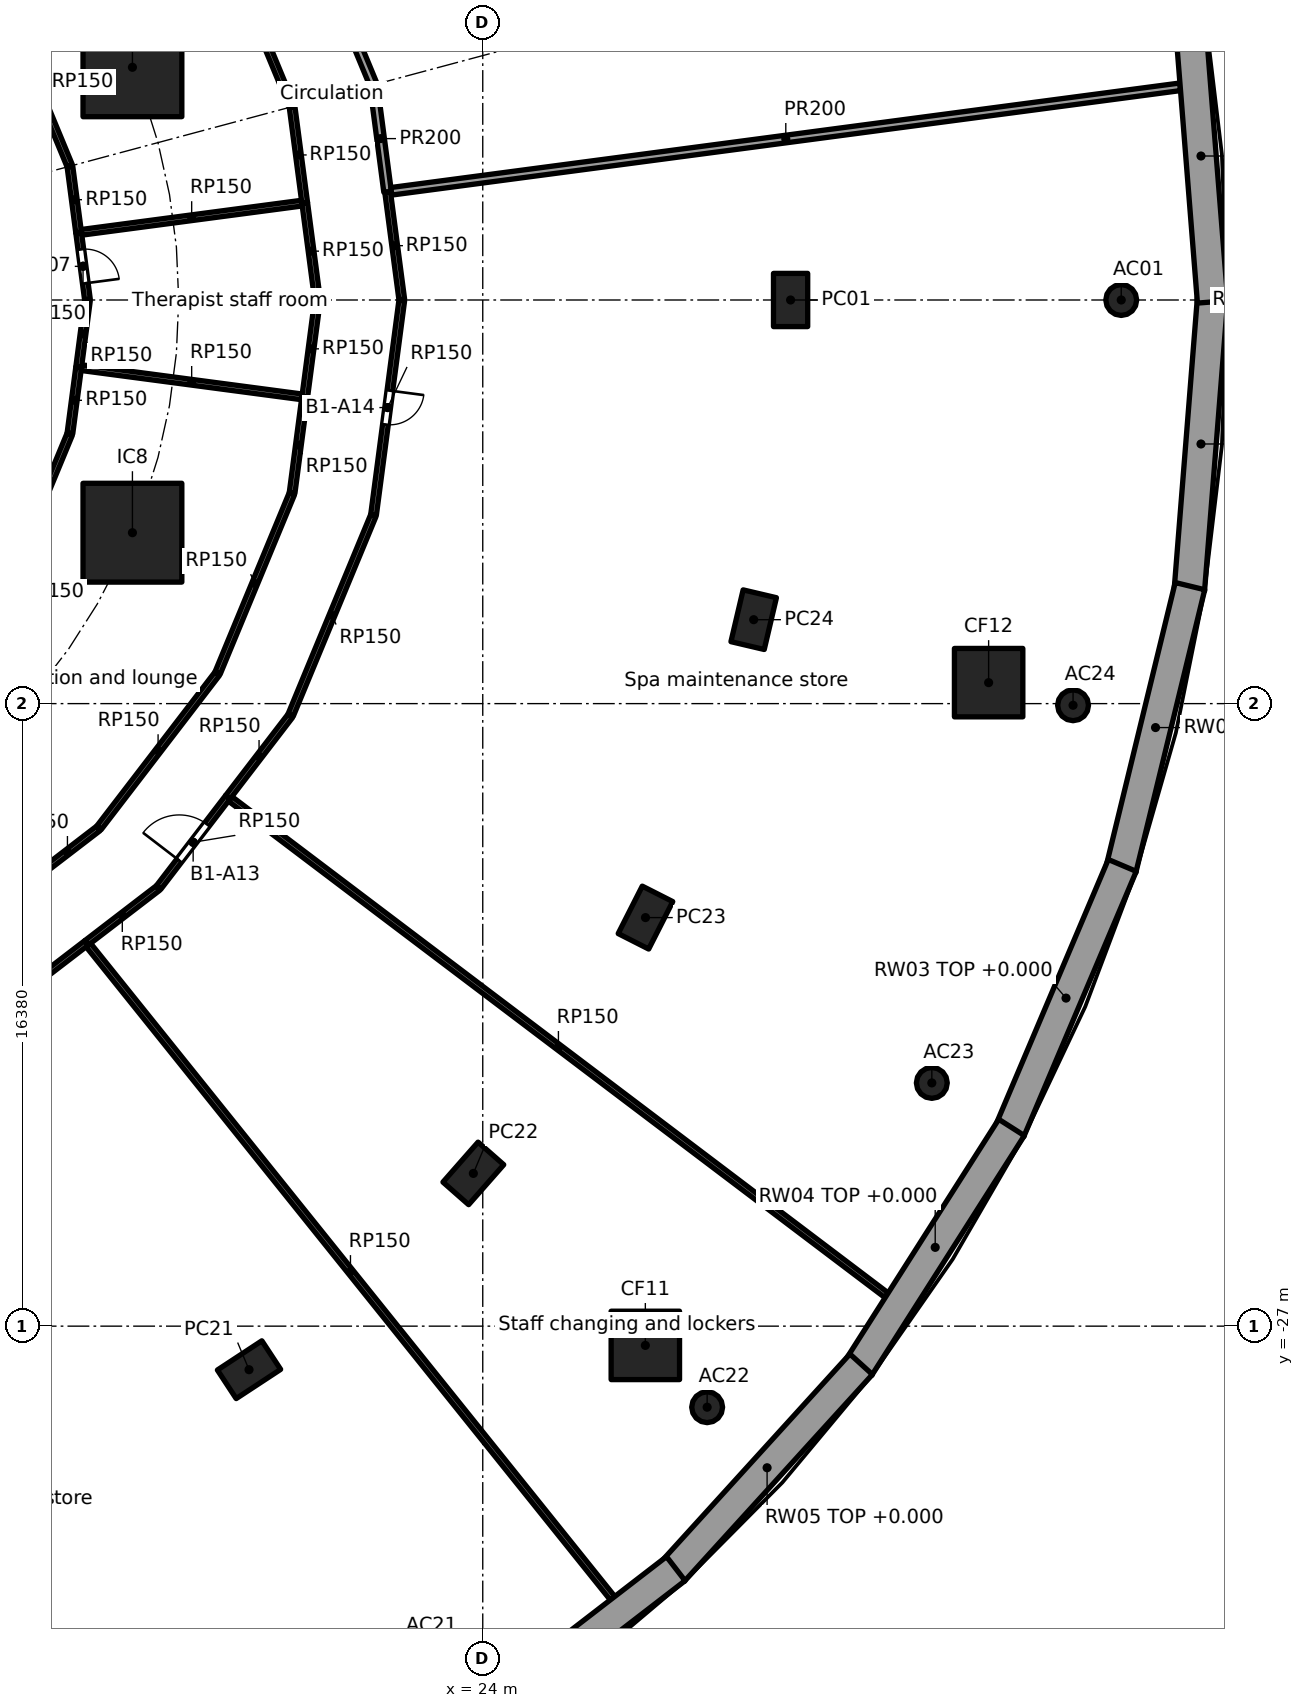
"""IFC4 building model, lengths in metres.
Left out: names, types, materials, properties, quantities, classifications, styles, units other than length and angle.
Written with IfcOpenShell. Run it as: python <this file> out.ifc"""

import sys

from ifc_helpers import new_model, si_unit, direction, frame, frame_2d, origin, origin_2d, place, context, subcontext, project, spatial, rectangle, hollow_rectangle, hollow_circle, extrude, element, fill, save


model = new_model("IFC4")
c1 = context("Model", 3, precision=1e-05, world=origin(), true_north=direction((0.0, 1.0)))
c2 = subcontext(c1, "Body", "Model", "MODEL_VIEW")
j1 = project(units=[si_unit("LENGTHUNIT", "METRE"), si_unit("PLANEANGLEUNIT", "RADIAN")], contexts=[c1])
p1 = place(None, origin())
s1 = spatial("IfcSite", under=j1, at=p1, CompositionType="ELEMENT")
p2 = place(p1, origin())
s2 = spatial("IfcBuilding", under=s1, at=p2, CompositionType="ELEMENT")
p3 = place(p2, frame((0.0, 0.0, -5.0)))
s3 = spatial("IfcBuildingStorey", under=s2, at=p3, CompositionType="ELEMENT", Elevation=-5.0)
p4 = place(p3, frame((43.204, 0.05, 0.0), z_axis=(0.0, 0.0, 1.0), x_axis=(-0.079287821658, -0.996851764977, 0.0)))
e1 = element("IfcWall", 1, at=p4, inside=s3, PredefinedType="SOLIDWALL", context=c2, shape_type="SweptSolid", body=[
    extrude(rectangle(XDim=7.701, YDim=0.8, at=frame_2d((3.851, 0.0))), origin(), (0.0, 0.0, 1.0), 5.0),
])
p5 = place(p3, frame((42.609, -7.529, 0.0), z_axis=(0.0, 0.0, 1.0), x_axis=(-0.236659774211, -0.971592585022, 0.0)))
e2 = element("IfcWall", 2, at=p5, inside=s3, PredefinedType="SOLIDWALL", context=c2, shape_type="SweptSolid", body=[
    extrude(rectangle(XDim=7.661, YDim=0.8, at=frame_2d((3.83, 0.0))), origin(), (0.0, 0.0, 1.0), 5.0),
])
p6 = place(p3, frame((40.827, -14.877, 0.0), z_axis=(0.0, 0.0, 1.0), x_axis=(-0.390299354435, -0.920688011179, 0.0)))
e3 = element("IfcWall", 3, at=p6, inside=s3, PredefinedType="SOLIDWALL", context=c2, shape_type="SweptSolid", body=[
    extrude(rectangle(XDim=7.584, YDim=0.8, at=frame_2d((3.792, 0.0))), origin(), (0.0, 0.0, 1.0), 5.0),
])
p7 = place(p3, frame((37.913, -21.772, 0.0), z_axis=(0.0, 0.0, 1.0), x_axis=(-0.53696630052, -0.843603693748, 0.0)))
e4 = element("IfcWall", 4, at=p7, inside=s3, PredefinedType="SOLIDWALL", context=c2, shape_type="SweptSolid", body=[
    extrude(rectangle(XDim=7.48, YDim=0.8, at=frame_2d((3.74, 0.0))), origin(), (0.0, 0.0, 1.0), 5.0),
])
p8 = place(p3, frame((33.957, -28.003, 0.0), z_axis=(0.0, 0.0, 1.0), x_axis=(-0.672652980875, -0.73995808484, 0.0)))
e5 = element("IfcWall", 5, at=p8, inside=s3, PredefinedType="SOLIDWALL", context=c2, shape_type="SweptSolid", body=[
    extrude(rectangle(XDim=7.36, YDim=0.8, at=frame_2d((3.68, 0.0))), origin(), (0.0, 0.0, 1.0), 5.0),
])
p9 = place(p3, frame((29.08, -33.381, 0.0), z_axis=(0.0, 0.0, 1.0), x_axis=(-0.792235092298, -0.610215993343, 0.0)))
e6 = element("IfcWall", 6, at=p9, inside=s3, PredefinedType="SOLIDWALL", context=c2, shape_type="SweptSolid", body=[
    extrude(rectangle(XDim=7.238, YDim=0.8, at=frame_2d((3.619, 0.0))), origin(), (0.0, 0.0, 1.0), 5.0),
])
p10 = place(p3, frame((42.593, 7.627, 0.0), z_axis=(0.0, 0.0, 1.0), x_axis=(0.079287821658, -0.996851764977, 0.0)))
e7 = element("IfcWall", 7, at=p10, inside=s3, PredefinedType="SOLIDWALL", context=c2, shape_type="SweptSolid", body=[
    extrude(rectangle(XDim=7.701, YDim=0.8, at=frame_2d((3.851, 0.0))), origin(), (0.0, 0.0, 1.0), 5.0),
])
for number, where, z_axis, x_axis in (
    (8, (32.1, 0.0, 0.0), (0.0, 0.0, 1.0), (0.0, 1.0, 0.0)),
    (9, (17.85, -28.146, 0.0), (0.0, 0.0, 1.0), (0.836, 0.549, 0.0)),
    (10, (23.752, -22.981, 0.0), (0.0, 0.0, 1.0), (0.66, 0.751, 0.0)),
    (11, (28.282, -16.25, 0.0), (0.0, 0.0, 1.0), (0.452, 0.892, 0.0)),
    (12, (31.129, -8.412, 0.0), (0.0, 0.0, 1.0), (0.229, 0.973, 0.0)),
):
    element("IfcColumn", number, at=place(p3, frame(where, z_axis=z_axis, x_axis=x_axis)), inside=s3, PredefinedType="COLUMN", context=c2, shape_type="SweptSolid", body=[
        extrude(hollow_rectangle(XDim=1.4, YDim=0.9, WallThickness=0.05, at=origin_2d()), origin(), (0.0, 0.0, 1.0), 5.0),
    ])
for number, where, z_axis, x_axis in (
    (13, (14.782, 6.123, 0.0), (0.0, 0.0, 1.0), (1.0, 0.0, 0.0)),
    (14, (14.782, -6.123, 0.0), (0.0, 0.0, 1.0), (1.0, 0.0, 0.0)),
):
    element("IfcColumn", number, at=place(p3, frame(where, z_axis=z_axis, x_axis=x_axis)), inside=s3, PredefinedType="COLUMN", context=c2, shape_type="SweptSolid", body=[
        extrude(rectangle(XDim=2.6, YDim=2.6, at=origin_2d()), origin(), (0.0, 0.0, 1.0), 5.0),
    ])
for number, where, z_axis, x_axis in (
    (15, (40.8, 0.0, 0.0), (0.0, 0.0, 1.0), (1.0, 0.0, 0.0)),
    (16, (29.904, -29.133, 0.0), (0.0, 0.0, 1.0), (1.0, 0.0, 0.0)),
    (17, (35.816, -20.6, 0.0), (0.0, 0.0, 1.0), (1.0, 0.0, 0.0)),
    (18, (39.532, -10.663, 0.0), (0.0, 0.0, 1.0), (1.0, 0.0, 0.0)),
):
    element("IfcColumn", number, at=place(p3, frame(where, z_axis=z_axis, x_axis=x_axis)), inside=s3, PredefinedType="COLUMN", context=c2, shape_type="SweptSolid", body=[
        extrude(hollow_circle(Radius=0.406, WallThickness=0.025, at=origin_2d()), origin(), (0.0, 0.0, 1.0), 5.0),
    ])
for number, where, z_axis, x_axis in (
    (19, (28.278, -27.506, 0.0), (0.0, 0.0, 1.0), (1.0, 0.0, 0.0)),
    (20, (37.311, -10.068, 0.0), (0.0, 0.0, 1.0), (1.0, 0.0, 0.0)),
):
    element("IfcColumn", number, at=place(p3, frame(where, z_axis=z_axis, x_axis=x_axis)), inside=s3, PredefinedType="COLUMN", context=c2, shape_type="SweptSolid", body=[
        extrude(rectangle(XDim=1.8, YDim=1.8, at=origin_2d()), origin(), (0.0, 0.0, 1.0), 5.0),
    ])
p11 = place(p3, frame((11.782, 6.789, 0.0), z_axis=(0.0, 0.0, 1.0), x_axis=(0.382677866108, -0.923881838111, 0.0)))
e21 = element("IfcWall", 21, at=p11, inside=s3, PredefinedType="PARTITIONING", context=c2, shape_type="SweptSolid", body=[
    extrude(rectangle(XDim=3.527, YDim=0.15, at=frame_2d((1.763, 0.0))), origin(), (0.0, 0.0, 1.0), 4.6),
])
p12 = place(p3, frame((12.258, -15.153, 0.0), z_axis=(0.0, 0.0, 1.0), x_axis=(0.793344054907, 0.608773529766, 0.0)))
e22 = element("IfcWall", 22, at=p12, inside=s3, PredefinedType="PARTITIONING", context=c2, shape_type="SweptSolid", body=[
    extrude(rectangle(XDim=2.053, YDim=0.15, at=frame_2d((1.026, 0.0))), origin(), (0.0, 0.0, 1.0), 4.6),
])
p13 = place(p3, frame((13.132, -3.531, 0.0), z_axis=(0.0, 0.0, 1.0), x_axis=(-0.382677866108, -0.923881838111, 0.0)))
e23 = element("IfcWall", 23, at=p13, inside=s3, PredefinedType="PARTITIONING", context=c2, shape_type="SweptSolid", body=[
    extrude(rectangle(XDim=3.527, YDim=0.15, at=frame_2d((1.763, 0.0))), origin(), (0.0, 0.0, 1.0), 4.6),
])
for number, where, z_axis, x_axis in (
    (24, (13.138, 3.508, 0.0), (0.0, 0.0, 1.0), (0.131, -0.991, 0.0)),
    (25, (13.367, -1.771, 0.0), (0.0, 0.0, 1.0), (-0.131, -0.991, 0.0)),
):
    element("IfcWall", number, at=place(p3, frame(where, z_axis=z_axis, x_axis=x_axis)), inside=s3, PredefinedType="PARTITIONING", context=c2, shape_type="SweptSolid", body=[
        extrude(rectangle(XDim=1.752, YDim=0.15, at=frame_2d((0.876, 0.0))), origin(), (0.0, 0.0, 1.0), 4.6),
    ])
p14 = place(p3, frame((13.441, -1.78, 0.0), z_axis=(0.0, 0.0, 1.0), x_axis=(0.991338713347, -0.13132994868, 0.0)))
e26 = element("IfcWall", 26, at=p14, inside=s3, PredefinedType="PARTITIONING", context=c2, shape_type="SweptSolid", body=[
    extrude(rectangle(XDim=5.85, YDim=0.15, at=frame_2d((2.925, 0.0))), origin(), (0.0, 0.0, 1.0), 4.6),
])
p15 = place(p3, frame((13.367, 1.771, 0.0), z_axis=(0.0, 0.0, 1.0), x_axis=(0.130468752885, -0.991452421713, 0.0)))
e27 = element("IfcWall", 27, at=p15, inside=s3, PredefinedType="PARTITIONING", context=c2, shape_type="SweptSolid", body=[
    extrude(rectangle(XDim=1.774, YDim=0.15, at=frame_2d((0.887, 0.0))), origin(), (0.0, 0.0, 1.0), 4.6),
])
p16 = place(p15, frame((0.443, 0.0, 0.0)))
e28 = element("IfcOpeningElement", 28, at=p16, cuts=e27, PredefinedType="OPENING", context=c2, shape_type="SweptSolid", body=[
    extrude(rectangle(XDim=0.9, YDim=2.1, at=frame_2d((0.45, 1.05))), frame((0.0, 0.085, 0.0), z_axis=(0.0, -1.0, 0.0), x_axis=(1.0, 0.0, 0.0)), (0.0, 0.0, 1.0), 0.17),
])
p17 = place(p3, frame((13.576, -16.915, 0.0), z_axis=(0.0, 0.0, 1.0), x_axis=(-0.793343228751, -0.608774606398, 0.0)))
e29 = element("IfcWall", 29, at=p17, inside=s3, PredefinedType="PARTITIONING", context=c2, shape_type="SweptSolid", body=[
    extrude(rectangle(XDim=3.316, YDim=0.15, at=frame_2d((1.658, 0.0))), origin(), (0.0, 0.0, 1.0), 4.6),
])
p18 = place(p3, frame((13.623, -16.973, 0.0), z_axis=(0.0, 0.0, 1.0), x_axis=(0.625937301781, -0.779873383467, 0.0)))
e30 = element("IfcWall", 30, at=p18, inside=s3, PredefinedType="PARTITIONING", context=c2, shape_type="SweptSolid", body=[
    extrude(rectangle(XDim=22.036, YDim=0.15, at=frame_2d((11.018, 0.0))), origin(), (0.0, 0.0, 1.0), 4.6),
])
p19 = place(p3, frame((13.598, -0.012, 0.0), z_axis=(0.0, 0.0, 1.0), x_axis=(-0.130468752885, -0.991452421713, 0.0)))
e31 = element("IfcWall", 31, at=p19, inside=s3, PredefinedType="PARTITIONING", context=c2, shape_type="SweptSolid", body=[
    extrude(rectangle(XDim=1.774, YDim=0.15, at=frame_2d((0.887, 0.0))), origin(), (0.0, 0.0, 1.0), 4.6),
])
p20 = place(p3, frame((13.903, -13.886, 0.0), z_axis=(0.0, 0.0, 1.0), x_axis=(0.608760705644, 0.793353895348, 0.0)))
e32 = element("IfcWall", 32, at=p20, inside=s3, PredefinedType="PARTITIONING", context=c2, shape_type="SweptSolid", body=[
    extrude(rectangle(XDim=5.106, YDim=0.15, at=frame_2d((2.553, 0.0))), origin(), (0.0, 0.0, 1.0), 4.6),
])
p21 = place(p3, frame((15.456, -15.472, 0.0), z_axis=(0.0, 0.0, 1.0), x_axis=(-0.793374130919, -0.608734333178, 0.0)))
e33 = element("IfcWall", 33, at=p21, inside=s3, PredefinedType="PARTITIONING", context=c2, shape_type="SweptSolid", body=[
    extrude(rectangle(XDim=2.369, YDim=0.15, at=frame_2d((1.185, 0.0))), origin(), (0.0, 0.0, 1.0), 4.6),
])
p22 = place(p3, frame((17.023, -9.815, 0.0), z_axis=(0.0, 0.0, 1.0), x_axis=(0.382672704618, 0.923883976017, 0.0)))
e34 = element("IfcWall", 34, at=p22, inside=s3, PredefinedType="PARTITIONING", context=c2, shape_type="SweptSolid", body=[
    extrude(rectangle(XDim=5.106, YDim=0.15, at=frame_2d((2.553, 0.0))), origin(), (0.0, 0.0, 1.0), 4.6),
])
p23 = place(p3, frame((17.295, -13.08, 0.0), z_axis=(0.0, 0.0, 1.0), x_axis=(-0.608756728417, -0.79335694716, 0.0)))
e35 = element("IfcWall", 35, at=p23, inside=s3, PredefinedType="PARTITIONING", context=c2, shape_type="SweptSolid", body=[
    extrude(rectangle(XDim=2.994, YDim=0.15, at=frame_2d((1.497, 0.0))), origin(), (0.0, 0.0, 1.0), 4.6),
])
p24 = place(p23, frame((0.903, 0.0, 0.0)))
e36 = element("IfcOpeningElement", 36, at=p24, cuts=e35, PredefinedType="OPENING", context=c2, shape_type="SweptSolid", body=[
    extrude(rectangle(XDim=1.2, YDim=2.1, at=frame_2d((0.6, 1.05))), frame((0.0, 0.085, 0.0), z_axis=(0.0, -1.0, 0.0), x_axis=(1.0, 0.0, 0.0)), (0.0, 0.0, 1.0), 0.17),
])
p25 = place(p3, frame((17.355, -13.125, 0.0), z_axis=(0.0, 0.0, 1.0), x_axis=(0.797578767878, -0.603214811681, 0.0)))
e37 = element("IfcWall", 37, at=p25, inside=s3, PredefinedType="PARTITIONING", context=c2, shape_type="SweptSolid", body=[
    extrude(rectangle(XDim=21.656, YDim=0.15, at=frame_2d((10.828, 0.0))), origin(), (0.0, 0.0, 1.0), 4.6),
])
p26 = place(p3, frame((18.933, -10.945, 0.0), z_axis=(0.0, 0.0, 1.0), x_axis=(-0.608759040366, -0.793355173155, 0.0)))
e38 = element("IfcWall", 38, at=p26, inside=s3, PredefinedType="PARTITIONING", context=c2, shape_type="SweptSolid", body=[
    extrude(rectangle(XDim=2.691, YDim=0.15, at=frame_2d((1.346, 0.0))), origin(), (0.0, 0.0, 1.0), 4.6),
])
p27 = place(p3, frame((18.984, -5.074, 0.0), z_axis=(0.0, 0.0, 1.0), x_axis=(0.130544098359, 0.991442503821, 0.0)))
e39 = element("IfcWall", 39, at=p27, inside=s3, PredefinedType="PARTITIONING", context=c2, shape_type="SweptSolid", body=[
    extrude(rectangle(XDim=2.538, YDim=0.15, at=frame_2d((1.269, 0.0))), origin(), (0.0, 0.0, 1.0), 4.6),
])
p28 = place(p3, frame((18.978, 5.097, 0.0), z_axis=(0.0, 0.0, 1.0), x_axis=(-0.382672704618, 0.923883976017, 0.0)))
e40 = element("IfcWall", 40, at=p28, inside=s3, PredefinedType="PARTITIONING", context=c2, shape_type="SweptSolid", body=[
    extrude(rectangle(XDim=5.106, YDim=0.15, at=frame_2d((2.553, 0.0))), origin(), (0.0, 0.0, 1.0), 4.6),
])
p29 = place(p3, frame((19.315, -2.558, 0.0), z_axis=(0.0, 0.0, 1.0), x_axis=(0.130501227761, 0.991448147687, 0.0)))
e41 = element("IfcWall", 41, at=p29, inside=s3, PredefinedType="PARTITIONING", context=c2, shape_type="SweptSolid", body=[
    extrude(rectangle(XDim=2.569, YDim=0.15, at=frame_2d((1.284, 0.0))), origin(), (0.0, 0.0, 1.0), 4.6),
])
p30 = place(p3, frame((19.241, 2.549, 0.0), z_axis=(0.0, 0.0, 1.0), x_axis=(-0.991338713347, -0.13132994868, 0.0)))
e42 = element("IfcWall", 42, at=p30, inside=s3, PredefinedType="PARTITIONING", context=c2, shape_type="SweptSolid", body=[
    extrude(rectangle(XDim=5.85, YDim=0.15, at=frame_2d((2.925, 0.0))), origin(), (0.0, 0.0, 1.0), 4.6),
])
p31 = place(p3, frame((19.315, 2.558, 0.0), z_axis=(0.0, 0.0, 1.0), x_axis=(-0.130544098359, 0.991442503821, 0.0)))
e43 = element("IfcWall", 43, at=p31, inside=s3, PredefinedType="PARTITIONING", context=c2, shape_type="SweptSolid", body=[
    extrude(rectangle(XDim=2.538, YDim=0.15, at=frame_2d((1.269, 0.0))), origin(), (0.0, 0.0, 1.0), 4.6),
])
p32 = place(p3, frame((19.65, 0.012, 0.0), z_axis=(0.0, 0.0, 1.0), x_axis=(-0.130501227761, 0.991448147687, 0.0)))
e44 = element("IfcWall", 44, at=p32, inside=s3, PredefinedType="PARTITIONING", context=c2, shape_type="SweptSolid", body=[
    extrude(rectangle(XDim=2.569, YDim=0.15, at=frame_2d((1.284, 0.0))), origin(), (0.0, 0.0, 1.0), 4.6),
])
p33 = place(p3, frame((21.121, -5.672, 0.0), z_axis=(0.0, 0.0, 1.0), x_axis=(-0.38269058712, -0.923876568882, 0.0)))
e45 = element("IfcWall", 45, at=p33, inside=s3, PredefinedType="PARTITIONING", context=c2, shape_type="SweptSolid", body=[
    extrude(rectangle(XDim=5.686, YDim=0.15, at=frame_2d((2.843, 0.0))), origin(), (0.0, 0.0, 1.0), 4.6),
])
p34 = place(p3, frame((21.496, 2.847, 0.0), z_axis=(0.0, 0.0, 1.0), x_axis=(0.130525176299, -0.991444995122, 0.0)))
e46 = element("IfcWall", 46, at=p34, inside=s3, PredefinedType="PARTITIONING", context=c2, shape_type="SweptSolid", body=[
    extrude(rectangle(XDim=2.86, YDim=0.15, at=frame_2d((1.43, 0.0))), origin(), (0.0, 0.0, 1.0), 4.6),
])
p35 = place(p3, frame((21.869, -0.012, 0.0), z_axis=(0.0, 0.0, 1.0), x_axis=(-0.130532262837, -0.991444062143, 0.0)))
e47 = element("IfcWall", 47, at=p35, inside=s3, PredefinedType="PARTITIONING", context=c2, shape_type="SweptSolid", body=[
    extrude(rectangle(XDim=5.686, YDim=0.15, at=frame_2d((2.843, 0.0))), origin(), (0.0, 0.0, 1.0), 4.6),
])
p36 = place(p35, frame((2.393, 0.0, 0.0)))
e48 = element("IfcOpeningElement", 48, at=p36, cuts=e47, PredefinedType="OPENING", context=c2, shape_type="SweptSolid", body=[
    extrude(rectangle(XDim=0.9, YDim=2.1, at=frame_2d((0.45, 1.05))), frame((0.0, 0.085, 0.0), z_axis=(0.0, -1.0, 0.0), x_axis=(1.0, 0.0, 0.0)), (0.0, 0.0, 1.0), 0.17),
])
p37 = place(p3, frame((18.946, 10.921, 0.0), z_axis=(0.0, 0.0, 1.0), x_axis=(0.382688434814, -0.923877460413, 0.0)))
e49 = element("IfcWall", 49, at=p37, inside=s3, PredefinedType="PARTITIONING", context=c2, shape_type="SweptSolid", body=[
    extrude(rectangle(XDim=5.679, YDim=0.2, at=frame_2d((2.84, 0.0))), origin(), (0.0, 0.0, 1.0), 4.6),
])
p38 = place(p3, frame((21.127, 5.646, 0.0), z_axis=(0.0, 0.0, 1.0), x_axis=(0.130526113373, -0.991444871754, 0.0)))
e50 = element("IfcWall", 50, at=p38, inside=s3, PredefinedType="PARTITIONING", context=c2, shape_type="SweptSolid", body=[
    extrude(rectangle(XDim=2.823, YDim=0.2, at=frame_2d((1.411, 0.0))), origin(), (0.0, 0.0, 1.0), 4.6),
])
p39 = place(p3, frame((21.595, 2.86, 0.0), z_axis=(0.0, 0.0, 1.0), x_axis=(0.991340976906, 0.131312861164, 0.0)))
e51 = element("IfcWall", 51, at=p39, inside=s3, PredefinedType="PARTITIONING", context=c2, shape_type="SweptSolid", body=[
    extrude(rectangle(XDim=20.939, YDim=0.2, at=frame_2d((10.469, 0.0))), origin(), (0.0, 0.0, 1.0), 4.6),
])
p40 = place(p16, origin())
e52 = element("IfcDoor", 52, at=p40, inside=s3, OperationType="SINGLE_SWING_RIGHT", PredefinedType="DOOR", context=c2, shape_type="SweptSolid", body=[
    extrude(rectangle(XDim=0.9, YDim=2.1, at=frame_2d((0.45, 1.05))), frame((0.0, 0.025, 0.0), z_axis=(0.0, -1.0, 0.0), x_axis=(1.0, 0.0, 0.0)), (0.0, 0.0, 1.0), 0.05),
])
fill(e28, e52)
p41 = place(p24, frame((1.2, 0.0, 0.0), x_axis=(-1.0, 0.0, 0.0)))
e53 = element("IfcDoor", 53, at=p41, inside=s3, OperationType="SINGLE_SWING_LEFT", PredefinedType="DOOR", context=c2, shape_type="SweptSolid", body=[
    extrude(rectangle(XDim=1.2, YDim=2.1, at=frame_2d((0.6, 1.05))), frame((0.0, 0.025, 0.0), z_axis=(0.0, -1.0, 0.0), x_axis=(1.0, 0.0, 0.0)), (0.0, 0.0, 1.0), 0.05),
])
fill(e36, e53)
p42 = place(p36, origin())
e54 = element("IfcDoor", 54, at=p42, inside=s3, OperationType="SINGLE_SWING_LEFT", PredefinedType="DOOR", context=c2, shape_type="SweptSolid", body=[
    extrude(rectangle(XDim=0.9, YDim=2.1, at=frame_2d((0.45, 1.05))), frame((0.0, 0.025, 0.0), z_axis=(0.0, -1.0, 0.0), x_axis=(1.0, 0.0, 0.0)), (0.0, 0.0, 1.0), 0.05),
])
fill(e48, e54)
save(model, sys.argv[1])
